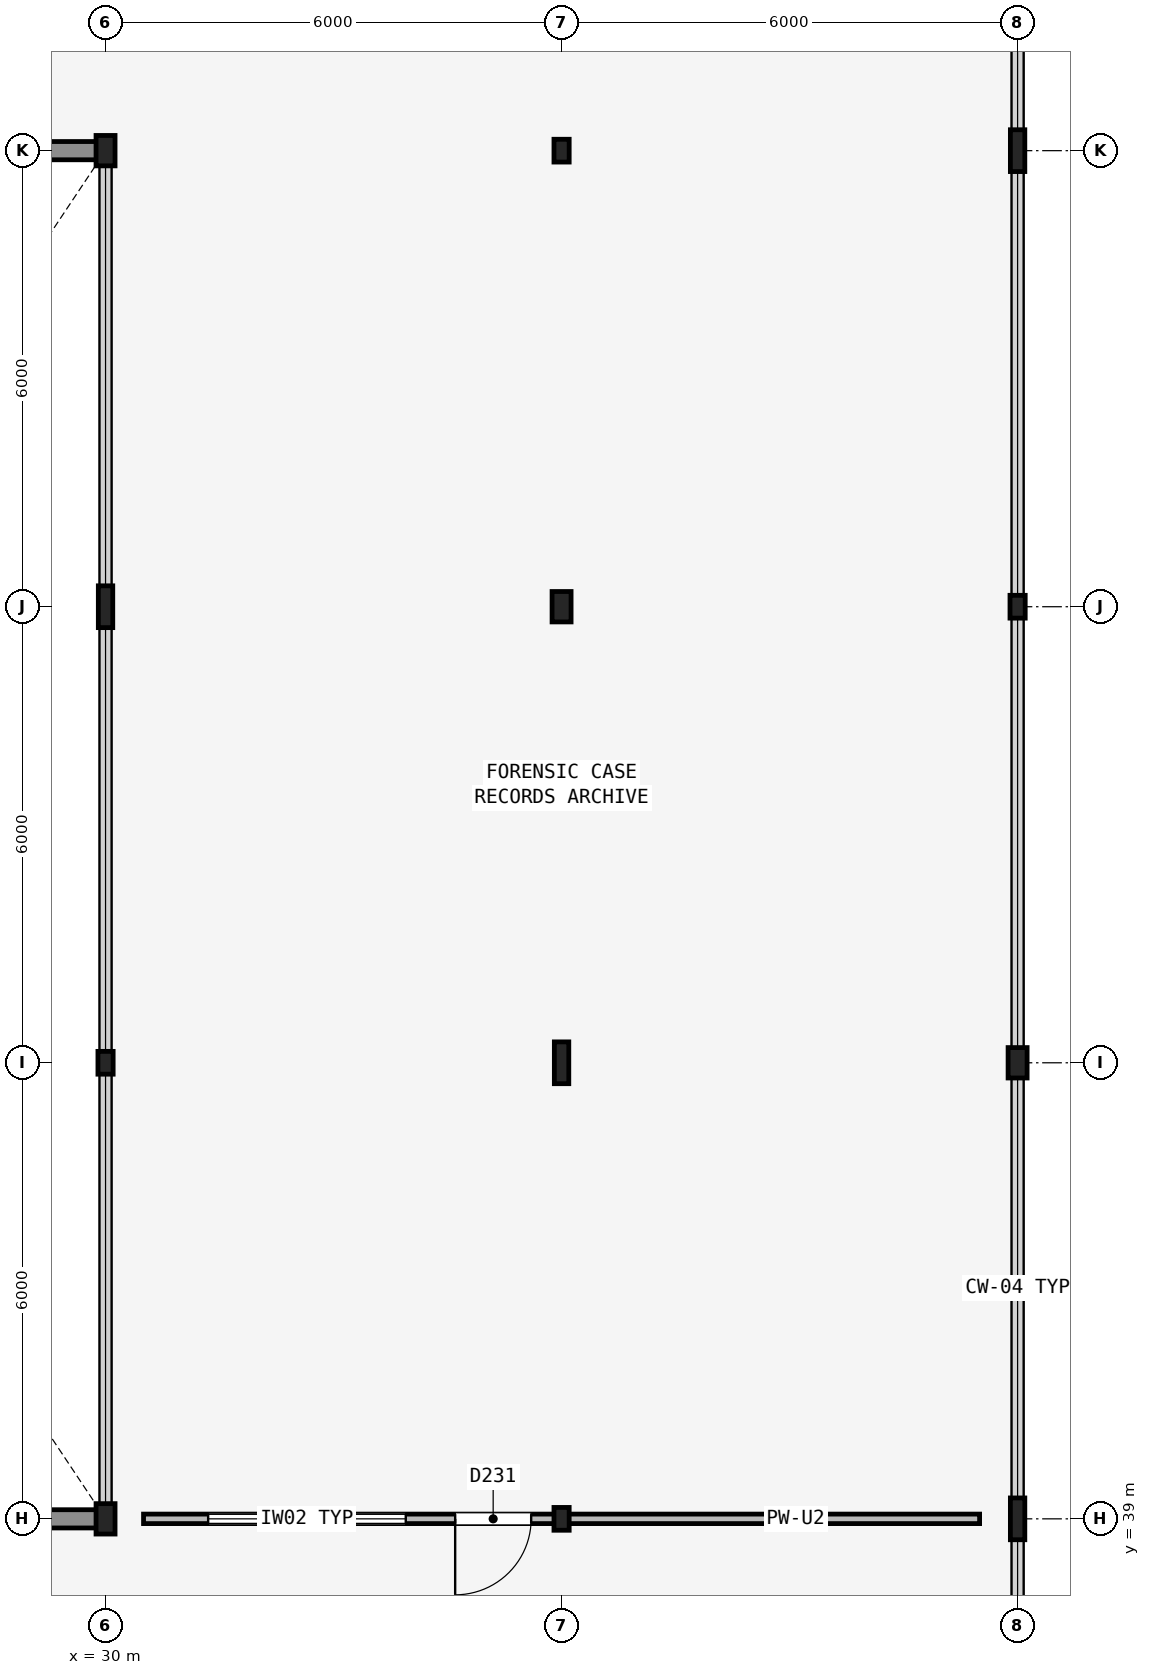
"""IFC4 building model, lengths in metres.
Left out: names, types, materials, properties, quantities, classifications, styles, units other than length and angle.
Written with IfcOpenShell. Run it as: python <this file> out.ifc"""

import sys

from ifc_helpers import new_model, si_unit, direction, frame, frame_2d, origin, origin_2d, place, context, subcontext, project, spatial, rectangle, hollow_rectangle, i_section, extrude, element, fill, save


model = new_model("IFC4")
c1 = context("Model", 3, precision=1e-05, world=origin(), true_north=direction((0.0, 1.0)))
c2 = subcontext(c1, "Body", "Model", "MODEL_VIEW")
j1 = project(units=[si_unit("LENGTHUNIT", "METRE"), si_unit("PLANEANGLEUNIT", "RADIAN")], contexts=[c1])
p1 = place(None, origin())
s1 = spatial("IfcSite", under=j1, at=p1, CompositionType="ELEMENT")
p2 = place(p1, origin())
s2 = spatial("IfcBuilding", under=s1, at=p2, CompositionType="ELEMENT")
p3 = place(p2, frame((0.0, 0.0, 9.3)))
s3 = spatial("IfcBuildingStorey", under=s2, at=p3, CompositionType="ELEMENT", Elevation=9.3)
p4 = place(p3, frame((30.0, 39.0, 0.0), z_axis=(0.0, 0.0, 1.0), x_axis=(1.0, 0.0, 0.0)))
e1 = element("IfcColumn", 1, at=p4, inside=s3, PredefinedType="COLUMN", context=c2, shape_type="SweptSolid", body=[
    extrude(i_section(OverallWidth=0.25, OverallDepth=0.4, WebThickness=0.01, FlangeThickness=0.013, FilletRadius=0.014, at=origin_2d()), origin(), (0.0, 0.0, 1.0), 4.2),
])
p5 = place(p3, frame((30.0, 45.0, 0.0), z_axis=(0.0, 0.0, 1.0), x_axis=(1.0, 0.0, 0.0)))
e2 = element("IfcColumn", 2, at=p5, inside=s3, PredefinedType="COLUMN", context=c2, shape_type="SweptSolid", body=[
    extrude(hollow_rectangle(XDim=0.2, YDim=0.3, WallThickness=0.012, InnerFilletRadius=0.012, OuterFilletRadius=0.024, at=origin_2d()), origin(), (0.0, 0.0, 1.0), 4.2),
])
p6 = place(p3, frame((30.0, 51.0, 0.0), z_axis=(0.0, 0.0, 1.0), x_axis=(1.0, 0.0, 0.0)))
e3 = element("IfcColumn", 3, at=p6, inside=s3, PredefinedType="COLUMN", context=c2, shape_type="SweptSolid", body=[
    extrude(i_section(OverallWidth=0.19, OverallDepth=0.55, WebThickness=0.011, FlangeThickness=0.019, FilletRadius=0.018, at=origin_2d()), origin(), (0.0, 0.0, 1.0), 4.2),
])
p7 = place(p3, frame((30.0, 57.0, 0.0), z_axis=(0.0, 0.0, 1.0), x_axis=(1.0, 0.0, 0.0)))
e4 = element("IfcColumn", 4, at=p7, inside=s3, PredefinedType="COLUMN", context=c2, shape_type="SweptSolid", body=[
    extrude(i_section(OverallWidth=0.25, OverallDepth=0.4, WebThickness=0.01, FlangeThickness=0.013, FilletRadius=0.014, at=origin_2d()), origin(), (0.0, 0.0, 1.0), 4.2),
])
p8 = place(p3, frame((36.0, 39.0, 0.0), z_axis=(0.0, 0.0, 1.0), x_axis=(1.0, 0.0, 0.0)))
e5 = element("IfcColumn", 5, at=p8, inside=s3, PredefinedType="COLUMN", context=c2, shape_type="SweptSolid", body=[
    extrude(hollow_rectangle(XDim=0.2, YDim=0.3, WallThickness=0.012, InnerFilletRadius=0.012, OuterFilletRadius=0.024, at=origin_2d()), origin(), (0.0, 0.0, 1.0), 4.2),
])
p9 = place(p3, frame((36.0, 45.0, 0.0), z_axis=(0.0, 0.0, 1.0), x_axis=(1.0, 0.0, 0.0)))
e6 = element("IfcColumn", 6, at=p9, inside=s3, PredefinedType="COLUMN", context=c2, shape_type="SweptSolid", body=[
    extrude(i_section(OverallWidth=0.19, OverallDepth=0.55, WebThickness=0.011, FlangeThickness=0.019, FilletRadius=0.018, at=origin_2d()), origin(), (0.0, 0.0, 1.0), 4.2),
])
p10 = place(p3, frame((36.0, 51.0, 0.0), z_axis=(0.0, 0.0, 1.0), x_axis=(1.0, 0.0, 0.0)))
e7 = element("IfcColumn", 7, at=p10, inside=s3, PredefinedType="COLUMN", context=c2, shape_type="SweptSolid", body=[
    extrude(i_section(OverallWidth=0.25, OverallDepth=0.4, WebThickness=0.01, FlangeThickness=0.013, FilletRadius=0.014, at=origin_2d()), origin(), (0.0, 0.0, 1.0), 4.2),
])
p11 = place(p3, frame((36.0, 57.0, 0.0), z_axis=(0.0, 0.0, 1.0), x_axis=(1.0, 0.0, 0.0)))
e8 = element("IfcColumn", 8, at=p11, inside=s3, PredefinedType="COLUMN", context=c2, shape_type="SweptSolid", body=[
    extrude(hollow_rectangle(XDim=0.2, YDim=0.3, WallThickness=0.012, InnerFilletRadius=0.012, OuterFilletRadius=0.024, at=origin_2d()), origin(), (0.0, 0.0, 1.0), 4.2),
])
p12 = place(p3, frame((42.0, 39.0, 0.0), z_axis=(0.0, 0.0, 1.0), x_axis=(1.0, 0.0, 0.0)))
e9 = element("IfcColumn", 9, at=p12, inside=s3, PredefinedType="COLUMN", context=c2, shape_type="SweptSolid", body=[
    extrude(i_section(OverallWidth=0.19, OverallDepth=0.55, WebThickness=0.011, FlangeThickness=0.019, FilletRadius=0.018, at=origin_2d()), origin(), (0.0, 0.0, 1.0), 4.2),
])
p13 = place(p3, frame((42.0, 45.0, 0.0), z_axis=(0.0, 0.0, 1.0), x_axis=(1.0, 0.0, 0.0)))
e10 = element("IfcColumn", 10, at=p13, inside=s3, PredefinedType="COLUMN", context=c2, shape_type="SweptSolid", body=[
    extrude(i_section(OverallWidth=0.25, OverallDepth=0.4, WebThickness=0.01, FlangeThickness=0.013, FilletRadius=0.014, at=origin_2d()), origin(), (0.0, 0.0, 1.0), 4.2),
])
p14 = place(p3, frame((42.0, 51.0, 0.0), z_axis=(0.0, 0.0, 1.0), x_axis=(1.0, 0.0, 0.0)))
e11 = element("IfcColumn", 11, at=p14, inside=s3, PredefinedType="COLUMN", context=c2, shape_type="SweptSolid", body=[
    extrude(hollow_rectangle(XDim=0.2, YDim=0.3, WallThickness=0.012, InnerFilletRadius=0.012, OuterFilletRadius=0.024, at=origin_2d()), origin(), (0.0, 0.0, 1.0), 4.2),
])
p15 = place(p3, frame((42.0, 57.0, 0.0), z_axis=(0.0, 0.0, 1.0), x_axis=(1.0, 0.0, 0.0)))
e12 = element("IfcColumn", 12, at=p15, inside=s3, PredefinedType="COLUMN", context=c2, shape_type="SweptSolid", body=[
    extrude(i_section(OverallWidth=0.19, OverallDepth=0.55, WebThickness=0.011, FlangeThickness=0.019, FilletRadius=0.018, at=origin_2d()), origin(), (0.0, 0.0, 1.0), 4.2),
])
p16 = place(p3, frame((24.0, 39.0, 0.0), z_axis=(0.0, 0.0, 1.0), x_axis=(1.0, 0.0, 0.0)))
e13 = element("IfcWall", 13, at=p16, inside=s3, PredefinedType="SOLIDWALL", context=c2, shape_type="SweptSolid", body=[
    extrude(rectangle(XDim=5.95, YDim=0.24, at=frame_2d((2.975, 0.0))), origin(), (0.0, 0.0, 1.0), 3.484),
])
p17 = place(p16, frame((2.275, 0.0, 0.85)))
e14 = element("IfcOpeningElement", 14, at=p17, cuts=e13, PredefinedType="OPENING", context=c2, shape_type="SweptSolid", body=[
    extrude(rectangle(XDim=1.4, YDim=1.8, at=frame_2d((0.7, 0.9))), frame((0.0, 0.13, 0.0), z_axis=(0.0, -1.0, 0.0), x_axis=(1.0, 0.0, 0.0)), (0.0, 0.0, 1.0), 0.26),
])
p18 = place(p3, frame((24.0, 57.0, 0.0), z_axis=(0.0, 0.0, 1.0), x_axis=(1.0, 0.0, 0.0)))
e15 = element("IfcWall", 15, at=p18, inside=s3, PredefinedType="SOLIDWALL", context=c2, shape_type="SweptSolid", body=[
    extrude(rectangle(XDim=5.95, YDim=0.24, at=frame_2d((2.975, 0.0))), origin(), (0.0, 0.0, 1.0), 3.29),
])
p19 = place(p18, frame((2.275, 0.0, 0.85)))
e16 = element("IfcOpeningElement", 16, at=p19, cuts=e15, PredefinedType="OPENING", context=c2, shape_type="SweptSolid", body=[
    extrude(rectangle(XDim=1.4, YDim=1.8, at=frame_2d((0.7, 0.9))), frame((0.0, 0.13, 0.0), z_axis=(0.0, -1.0, 0.0), x_axis=(1.0, 0.0, 0.0)), (0.0, 0.0, 1.0), 0.26),
])
p20 = place(p3, frame((41.5, 39.0, 0.0), z_axis=(0.0, 0.0, 1.0), x_axis=(-1.0, 0.0, 0.0)))
e17 = element("IfcWall", 17, at=p20, inside=s3, PredefinedType="PARTITIONING", context=c2, shape_type="SweptSolid", body=[
    extrude(rectangle(XDim=11.0, YDim=0.125, at=frame_2d((5.5, 0.0))), origin(), (0.0, 0.0, 1.0), 3.484),
])
p21 = place(p20, frame((5.9, 0.0, 0.0)))
e18 = element("IfcOpeningElement", 18, at=p21, cuts=e17, PredefinedType="OPENING", context=c2, shape_type="SweptSolid", body=[
    extrude(rectangle(XDim=1.0, YDim=2.15, at=frame_2d((0.5, 1.075))), frame((0.0, 0.073, 0.0), z_axis=(0.0, -1.0, 0.0), x_axis=(1.0, 0.0, 0.0)), (0.0, 0.0, 1.0), 0.145),
])
p22 = place(p20, frame((7.55, 0.0, 1.0)))
e19 = element("IfcOpeningElement", 19, at=p22, cuts=e17, PredefinedType="OPENING", context=c2, shape_type="SweptSolid", body=[
    extrude(rectangle(XDim=2.6, YDim=1.2, at=frame_2d((1.3, 0.6))), frame((0.0, 0.073, 0.0), z_axis=(0.0, -1.0, 0.0), x_axis=(1.0, 0.0, 0.0)), (0.0, 0.0, 1.0), 0.145),
])
p23 = place(p21, origin())
e20 = element("IfcDoor", 20, at=p23, inside=s3, OperationType="SINGLE_SWING_RIGHT", PredefinedType="DOOR", context=c2, shape_type="SweptSolid", body=[
    extrude(rectangle(XDim=1.0, YDim=2.15, at=frame_2d((0.5, 1.075))), frame((0.0, 0.025, 0.0), z_axis=(0.0, -1.0, 0.0), x_axis=(1.0, 0.0, 0.0)), (0.0, 0.0, 1.0), 0.05),
])
fill(e18, e20)
p24 = place(p22, origin())
e21 = element("IfcWindow", 21, at=p24, inside=s3, PartitioningType="SINGLE_PANEL", PredefinedType="WINDOW", context=c2, shape_type="SweptSolid", body=[
    extrude(rectangle(XDim=2.6, YDim=1.2, at=frame_2d((1.3, 0.6))), frame((0.0, 0.03, 0.0), z_axis=(0.0, -1.0, 0.0), x_axis=(1.0, 0.0, 0.0)), (0.0, 0.0, 1.0), 0.06),
])
fill(e19, e21)
save(model, sys.argv[1])
